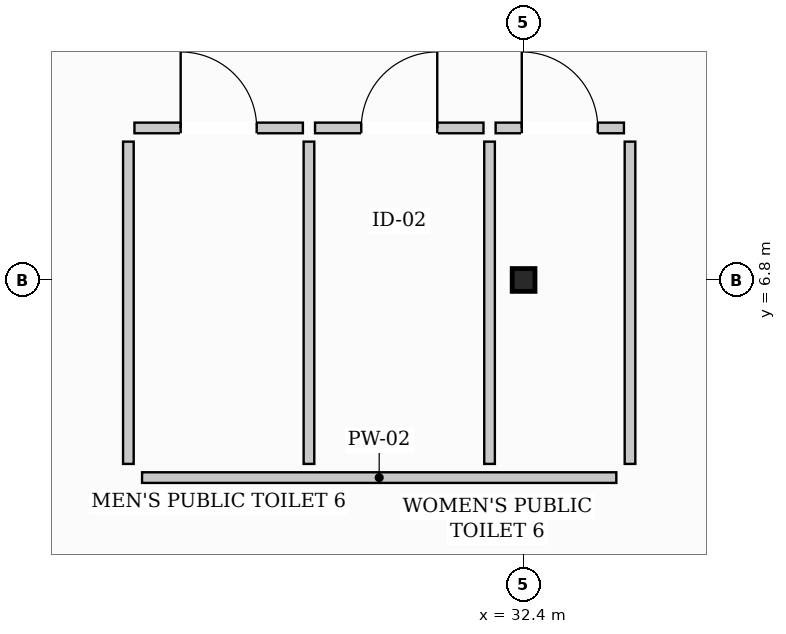
"""IFC4 building model, lengths in metres.
Left out: names, types, materials, properties, quantities, classifications, styles, units other than length and angle.
Written with IfcOpenShell. Run it as: python <this file> out.ifc"""

import sys

from ifc_helpers import new_model, si_unit, direction, frame, frame_2d, origin, origin_2d, place, context, subcontext, project, spatial, rectangle, i_section, extrude, element, fill, save


model = new_model("IFC4")
c1 = context("Model", 3, precision=1e-05, world=origin(), true_north=direction((0.0, 1.0)))
c2 = subcontext(c1, "Body", "Model", "MODEL_VIEW")
j1 = project(units=[si_unit("LENGTHUNIT", "METRE"), si_unit("PLANEANGLEUNIT", "RADIAN")], contexts=[c1])
p1 = place(None, origin())
s1 = spatial("IfcSite", under=j1, at=p1, CompositionType="ELEMENT")
p2 = place(p1, origin())
s2 = spatial("IfcBuilding", under=s1, at=p2, CompositionType="ELEMENT")
p3 = place(p2, frame((0.0, 0.0, 13.2)))
s3 = spatial("IfcBuildingStorey", under=s2, at=p3, CompositionType="ELEMENT", Elevation=13.2)
p4 = place(p3, frame((32.4, 6.8, 0.0), z_axis=(0.0, 0.0, 1.0), x_axis=(1.0, 0.0, 0.0)))
e1 = element("IfcColumn", 1, at=p4, inside=s3, PredefinedType="COLUMN", context=c2, shape_type="SweptSolid", body=[
    extrude(i_section(OverallWidth=0.3, OverallDepth=0.3, WebThickness=0.011, FlangeThickness=0.019, FilletRadius=0.027, at=origin_2d()), origin(), (0.0, 0.0, 1.0), 3.6),
])
p5 = place(p3, frame((27.38, 4.2, 0.0), z_axis=(0.0, 0.0, 1.0), x_axis=(1.0, 0.0, 0.0)))
e2 = element("IfcWall", 2, at=p5, inside=s3, PredefinedType="PARTITIONING", context=c2, shape_type="SweptSolid", body=[
    extrude(rectangle(XDim=6.24, YDim=0.14, at=frame_2d((3.12, 0.0))), origin(), (0.0, 0.0, 1.0), 2.79),
])
p6 = place(p3, frame((27.2, 4.38, 0.0), z_axis=(0.0, 0.0, 1.0), x_axis=(0.0, 1.0, 0.0)))
e3 = element("IfcWall", 3, at=p6, inside=s3, PredefinedType="PARTITIONING", context=c2, shape_type="SweptSolid", body=[
    extrude(rectangle(XDim=4.24, YDim=0.14, at=frame_2d((2.12, 0.0))), origin(), (0.0, 0.0, 1.0), 2.89),
])
p7 = place(p3, frame((33.8, 4.38, 0.0), z_axis=(0.0, 0.0, 1.0), x_axis=(0.0, 1.0, 0.0)))
e4 = element("IfcWall", 4, at=p7, inside=s3, PredefinedType="PARTITIONING", context=c2, shape_type="SweptSolid", body=[
    extrude(rectangle(XDim=4.24, YDim=0.14, at=frame_2d((2.12, 0.0))), origin(), (0.0, 0.0, 1.0), 2.94),
])
for number, where, z_axis, x_axis in (
    (5, (29.576, 4.38, 0.0), (0.0, 0.0, 1.0), (0.0, 1.0, 0.0)),
    (6, (31.952, 4.38, 0.0), (0.0, 0.0, 1.0), (0.0, 1.0, 0.0)),
):
    element("IfcWall", number, at=place(p3, frame(where, z_axis=z_axis, x_axis=x_axis)), inside=s3, PredefinedType="PARTITIONING", context=c2, shape_type="SweptSolid", body=[
        extrude(rectangle(XDim=4.24, YDim=0.14, at=frame_2d((2.12, 0.0))), origin(), (0.0, 0.0, 1.0), 2.89),
    ])
p8 = place(p3, frame((27.28, 8.8, 0.0), z_axis=(0.0, 0.0, 1.0), x_axis=(1.0, 0.0, 0.0)))
e7 = element("IfcWall", 7, at=p8, inside=s3, PredefinedType="PARTITIONING", context=c2, shape_type="SweptSolid", body=[
    extrude(rectangle(XDim=2.216, YDim=0.14, at=frame_2d((1.108, 0.0))), origin(), (0.0, 0.0, 1.0), 3.1),
])
p9 = place(p8, frame((0.608, 0.0, 0.0)))
e8 = element("IfcOpeningElement", 8, at=p9, cuts=e7, PredefinedType="OPENING", context=c2, shape_type="SweptSolid", body=[
    extrude(rectangle(XDim=1.0, YDim=2.15, at=frame_2d((0.5, 1.075))), frame((0.0, 0.08, 0.0), z_axis=(0.0, -1.0, 0.0), x_axis=(1.0, 0.0, 0.0)), (0.0, 0.0, 1.0), 0.16),
])
p10 = place(p3, frame((29.656, 8.8, 0.0), z_axis=(0.0, 0.0, 1.0), x_axis=(1.0, 0.0, 0.0)))
e9 = element("IfcWall", 9, at=p10, inside=s3, PredefinedType="PARTITIONING", context=c2, shape_type="SweptSolid", body=[
    extrude(rectangle(XDim=2.216, YDim=0.14, at=frame_2d((1.108, 0.0))), origin(), (0.0, 0.0, 1.0), 3.34),
])
p11 = place(p10, frame((0.608, 0.0, 0.0)))
e10 = element("IfcOpeningElement", 10, at=p11, cuts=e9, PredefinedType="OPENING", context=c2, shape_type="SweptSolid", body=[
    extrude(rectangle(XDim=1.0, YDim=2.15, at=frame_2d((0.5, 1.075))), frame((0.0, 0.08, 0.0), z_axis=(0.0, -1.0, 0.0), x_axis=(1.0, 0.0, 0.0)), (0.0, 0.0, 1.0), 0.16),
])
p12 = place(p3, frame((32.032, 8.8, 0.0), z_axis=(0.0, 0.0, 1.0), x_axis=(1.0, 0.0, 0.0)))
e11 = element("IfcWall", 11, at=p12, inside=s3, PredefinedType="PARTITIONING", context=c2, shape_type="SweptSolid", body=[
    extrude(rectangle(XDim=1.688, YDim=0.14, at=frame_2d((0.844, 0.0))), origin(), (0.0, 0.0, 1.0), 2.84),
])
p13 = place(p12, frame((0.344, 0.0, 0.0)))
e12 = element("IfcOpeningElement", 12, at=p13, cuts=e11, PredefinedType="OPENING", context=c2, shape_type="SweptSolid", body=[
    extrude(rectangle(XDim=1.0, YDim=2.15, at=frame_2d((0.5, 1.075))), frame((0.0, 0.08, 0.0), z_axis=(0.0, -1.0, 0.0), x_axis=(1.0, 0.0, 0.0)), (0.0, 0.0, 1.0), 0.16),
])
p14 = place(p9, origin())
e13 = element("IfcDoor", 13, at=p14, inside=s3, OperationType="SINGLE_SWING_LEFT", PredefinedType="DOOR", context=c2, shape_type="SweptSolid", body=[
    extrude(rectangle(XDim=1.0, YDim=2.15, at=frame_2d((0.5, 1.075))), frame((0.0, 0.025, 0.0), z_axis=(0.0, -1.0, 0.0), x_axis=(1.0, 0.0, 0.0)), (0.0, 0.0, 1.0), 0.05),
])
fill(e8, e13)
p15 = place(p11, origin())
e14 = element("IfcDoor", 14, at=p15, inside=s3, OperationType="SINGLE_SWING_RIGHT", PredefinedType="DOOR", context=c2, shape_type="SweptSolid", body=[
    extrude(rectangle(XDim=1.0, YDim=2.15, at=frame_2d((0.5, 1.075))), frame((0.0, 0.025, 0.0), z_axis=(0.0, -1.0, 0.0), x_axis=(1.0, 0.0, 0.0)), (0.0, 0.0, 1.0), 0.05),
])
fill(e10, e14)
p16 = place(p13, origin())
e15 = element("IfcDoor", 15, at=p16, inside=s3, OperationType="SINGLE_SWING_LEFT", PredefinedType="DOOR", context=c2, shape_type="SweptSolid", body=[
    extrude(rectangle(XDim=1.0, YDim=2.15, at=frame_2d((0.5, 1.075))), frame((0.0, 0.025, 0.0), z_axis=(0.0, -1.0, 0.0), x_axis=(1.0, 0.0, 0.0)), (0.0, 0.0, 1.0), 0.05),
])
fill(e12, e15)
save(model, sys.argv[1])
